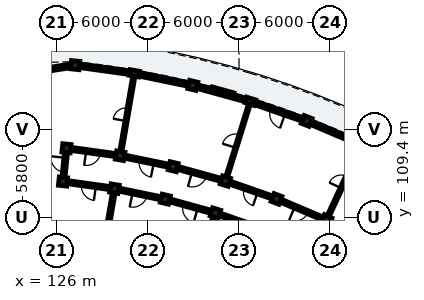
"""IFC4 building model, lengths in metres.
Left out: names, types, materials, properties, quantities, classifications, styles, units other than length and angle.
Written with IfcOpenShell. Run it as: python <this file> out.ifc"""

import sys

from ifc_helpers import new_model, si_unit, direction, frame, frame_2d, origin, origin_2d, place, context, subcontext, project, spatial, rectangle, extrude, element, fill, save


model = new_model("IFC4")
c1 = context("Model", 3, precision=1e-05, world=origin(), true_north=direction((0.0, 1.0)))
c2 = subcontext(c1, "Body", "Model", "MODEL_VIEW")
j1 = project(units=[si_unit("LENGTHUNIT", "METRE"), si_unit("PLANEANGLEUNIT", "RADIAN")], contexts=[c1])
p1 = place(None, origin())
s1 = spatial("IfcSite", under=j1, at=p1, CompositionType="ELEMENT")
p2 = place(p1, origin())
s2 = spatial("IfcBuilding", under=s1, at=p2, CompositionType="ELEMENT")
p3 = place(p2, frame((0.0, 0.0, 15.56)))
s3 = spatial("IfcBuildingStorey", under=s2, at=p3, CompositionType="ELEMENT", Elevation=15.56)
for number, where, z_axis, x_axis in (
    (1, (143.748, 109.23, 0.0), (0.0, 0.0, 1.0), (0.421, 0.907, 0.0)),
    (2, (140.468, 110.622, 0.0), (0.0, 0.0, 1.0), (0.36, 0.933, 0.0)),
    (3, (142.448, 115.753, 0.0), (0.0, 0.0, 1.0), (0.36, 0.933, 0.0)),
    (4, (136.448, 109.695, 0.0), (0.0, 0.0, 1.0), (0.298, 0.955, 0.0)),
    (5, (137.103, 111.795, 0.0), (0.0, 0.0, 1.0), (0.298, 0.955, 0.0)),
):
    element("IfcColumn", number, at=place(p3, frame(where, z_axis=z_axis, x_axis=x_axis)), inside=s3, PredefinedType="COLUMN", context=c2, shape_type="SweptSolid", body=[
        extrude(rectangle(XDim=0.55, YDim=0.55, at=origin_2d()), origin(), (0.0, 0.0, 1.0), 3.11),
    ])
p4 = place(p3, frame((138.742, 117.046, 0.0), z_axis=(0.0, 0.0, 1.0), x_axis=(0.297930225503, 0.954587649581, 0.0)))
e6 = element("IfcColumn", 6, at=p4, inside=s3, PredefinedType="PILASTER", context=c2, shape_type="SweptSolid", body=[
    extrude(rectangle(XDim=0.38, YDim=0.62, at=origin_2d()), origin(), (0.0, 0.0, 1.0), 3.11),
])
for number, where, z_axis, x_axis in (
    (7, (133.153, 110.606, 0.0), (0.0, 0.0, 1.0), (0.234, 0.972, 0.0)),
    (8, (133.669, 112.744, 0.0), (0.0, 0.0, 1.0), (0.234, 0.972, 0.0)),
    (9, (134.958, 118.091, 0.0), (0.0, 0.0, 1.0), (0.234, 0.972, 0.0)),
    (10, (129.806, 111.297, 0.0), (0.0, 0.0, 1.0), (0.17, 0.985, 0.0)),
    (11, (130.179, 113.465, 0.0), (0.0, 0.0, 1.0), (0.17, 0.985, 0.0)),
):
    element("IfcColumn", number, at=place(p3, frame(where, z_axis=z_axis, x_axis=x_axis)), inside=s3, PredefinedType="COLUMN", context=c2, shape_type="SweptSolid", body=[
        extrude(rectangle(XDim=0.55, YDim=0.55, at=origin_2d()), origin(), (0.0, 0.0, 1.0), 3.11),
    ])
p5 = place(p3, frame((131.113, 118.885, 0.0), z_axis=(0.0, 0.0, 1.0), x_axis=(0.169827230012, 0.985473851478, 0.0)))
e12 = element("IfcColumn", 12, at=p5, inside=s3, PredefinedType="PILASTER", context=c2, shape_type="SweptSolid", body=[
    extrude(rectangle(XDim=0.38, YDim=0.62, at=origin_2d()), origin(), (0.0, 0.0, 1.0), 3.11),
])
for number, where, z_axis, x_axis in (
    (13, (126.42, 111.766, 0.0), (0.0, 0.0, 1.0), (0.105, 0.995, 0.0)),
    (14, (126.65, 113.954, 0.0), (0.0, 0.0, 1.0), (0.105, 0.995, 0.0)),
    (15, (127.225, 119.424, 0.0), (0.0, 0.0, 1.0), (0.105, 0.995, 0.0)),
):
    element("IfcColumn", number, at=place(p3, frame(where, z_axis=z_axis, x_axis=x_axis)), inside=s3, PredefinedType="COLUMN", context=c2, shape_type="SweptSolid", body=[
        extrude(rectangle(XDim=0.55, YDim=0.55, at=origin_2d()), origin(), (0.0, 0.0, 1.0), 3.11),
    ])
p6 = place(p3, frame((145.915, 114.282, 0.0), z_axis=(0.0, 0.0, 1.0), x_axis=(-0.920502438884, 0.390736816807, 0.0)))
e16 = element("IfcWall", 16, at=p6, inside=s3, PredefinedType="SOLIDWALL", context=c2, shape_type="SweptSolid", body=[
    extrude(rectangle(XDim=3.521, YDim=0.24, at=frame_2d((1.76, 0.0))), origin(), (0.0, 0.0, 1.0), 2.355),
])
p7 = place(p6, frame((0.885, 0.0, 0.35)))
e17 = element("IfcOpeningElement", 17, at=p7, cuts=e16, PredefinedType="OPENING", context=c2, shape_type="SweptSolid", body=[
    extrude(rectangle(XDim=1.75, YDim=1.85, at=frame_2d((0.875, 0.925))), frame((0.0, 0.13, 0.0), z_axis=(0.0, -1.0, 0.0), x_axis=(1.0, 0.0, 0.0)), (0.0, 0.0, 1.0), 0.26),
])
p8 = place(p3, frame((142.217, 115.834, 0.0), z_axis=(0.0, 0.0, 1.0), x_axis=(-0.944267366677, 0.329179495455, 0.0)))
e18 = element("IfcWall", 18, at=p8, inside=s3, PredefinedType="SOLIDWALL", context=c2, shape_type="SweptSolid", body=[
    extrude(rectangle(XDim=3.521, YDim=0.24, at=frame_2d((1.76, 0.0))), origin(), (0.0, 0.0, 1.0), 2.355),
])
p9 = place(p8, frame((1.25, 0.0, 0.0)))
e19 = element("IfcOpeningElement", 19, at=p9, cuts=e18, PredefinedType="OPENING", context=c2, shape_type="SweptSolid", body=[
    extrude(rectangle(XDim=1.02, YDim=2.14, at=frame_2d((0.51, 1.07))), frame((0.0, 0.13, 0.0), z_axis=(0.0, -1.0, 0.0), x_axis=(1.0, 0.0, 0.0)), (0.0, 0.0, 1.0), 0.26),
])
p10 = place(p3, frame((138.587, 117.088, 0.0), z_axis=(0.0, 0.0, 1.0), x_axis=(-0.963894473631, 0.266284516456, 0.0)))
e20 = element("IfcWall", 20, at=p10, inside=s3, PredefinedType="SOLIDWALL", context=c2, shape_type="SweptSolid", body=[
    extrude(rectangle(XDim=3.521, YDim=0.24, at=frame_2d((1.76, 0.0))), origin(), (0.0, 0.0, 1.0), 2.355),
])
p11 = place(p10, frame((1.02, 0.0, 0.55)))
e21 = element("IfcOpeningElement", 21, at=p11, cuts=e20, PredefinedType="OPENING", context=c2, shape_type="SweptSolid", body=[
    extrude(rectangle(XDim=1.48, YDim=1.62, at=frame_2d((0.74, 0.81))), frame((0.0, 0.13, 0.0), z_axis=(0.0, -1.0, 0.0), x_axis=(1.0, 0.0, 0.0)), (0.0, 0.0, 1.0), 0.26),
])
p12 = place(p3, frame((134.718, 118.141, 0.0), z_axis=(0.0, 0.0, 1.0), x_axis=(-0.979340051053, 0.202220336275, 0.0)))
e22 = element("IfcWall", 22, at=p12, inside=s3, PredefinedType="SOLIDWALL", context=c2, shape_type="SweptSolid", body=[
    extrude(rectangle(XDim=3.521, YDim=0.24, at=frame_2d((1.76, 0.0))), origin(), (0.0, 0.0, 1.0), 2.355),
])
p13 = place(p12, frame((1.16, 0.0, 0.55)))
e23 = element("IfcOpeningElement", 23, at=p13, cuts=e22, PredefinedType="OPENING", context=c2, shape_type="SweptSolid", body=[
    extrude(rectangle(XDim=1.2, YDim=1.51, at=frame_2d((0.6, 0.755))), frame((0.0, 0.13, 0.0), z_axis=(0.0, -1.0, 0.0), x_axis=(1.0, 0.0, 0.0)), (0.0, 0.0, 1.0), 0.26),
])
p14 = place(p3, frame((130.955, 118.907, 0.0), z_axis=(0.0, 0.0, 1.0), x_axis=(-0.990539718913, 0.137226328578, 0.0)))
e24 = element("IfcWall", 24, at=p14, inside=s3, PredefinedType="SOLIDWALL", context=c2, shape_type="SweptSolid", body=[
    extrude(rectangle(XDim=3.521, YDim=0.24, at=frame_2d((1.76, 0.0))), origin(), (0.0, 0.0, 1.0), 2.355),
])
p15 = place(p14, frame((1.1, 0.0, 0.55)))
e25 = element("IfcOpeningElement", 25, at=p15, cuts=e24, PredefinedType="OPENING", context=c2, shape_type="SweptSolid", body=[
    extrude(rectangle(XDim=1.32, YDim=1.585, at=frame_2d((0.66, 0.792))), frame((0.0, 0.13, 0.0), z_axis=(0.0, -1.0, 0.0), x_axis=(1.0, 0.0, 0.0)), (0.0, 0.0, 1.0), 0.26),
])
p16 = place(p3, frame((123.365, 118.812, 0.0), z_axis=(0.0, 0.0, 1.0), x_axis=(0.987690429048, 0.156421278498, 0.0)))
e26 = element("IfcWall", 26, at=p16, inside=s3, PredefinedType="SOLIDWALL", context=c2, shape_type="SweptSolid", body=[
    extrude(rectangle(XDim=3.908, YDim=0.24, at=frame_2d((1.954, 0.0))), origin(), (0.0, 0.0, 1.0), 2.355),
])
p17 = place(p16, frame((1.029, 0.0, 0.4)))
e27 = element("IfcOpeningElement", 27, at=p17, cuts=e26, PredefinedType="OPENING", context=c2, shape_type="SweptSolid", body=[
    extrude(rectangle(XDim=1.85, YDim=1.72, at=frame_2d((0.925, 0.86))), frame((0.0, 0.13, 0.0), z_axis=(0.0, -1.0, 0.0), x_axis=(1.0, 0.0, 0.0)), (0.0, 0.0, 1.0), 0.26),
])
p18 = place(p3, frame((143.916, 109.593, 0.0), z_axis=(0.0, 0.0, 1.0), x_axis=(0.420862519045, 0.907124434718, 0.0)))
e28 = element("IfcWall", 28, at=p18, inside=s3, PredefinedType="PLUMBINGWALL", context=c2, shape_type="SweptSolid", body=[
    extrude(rectangle(XDim=4.7, YDim=0.15, at=frame_2d((2.35, 0.0))), origin(), (0.0, 0.0, 1.0), 2.37),
])
p19 = place(p18, frame((1.92, 0.0, 0.0)))
e29 = element("IfcOpeningElement", 29, at=p19, cuts=e28, PredefinedType="OPENING", context=c2, shape_type="SweptSolid", body=[
    extrude(rectangle(XDim=0.86, YDim=2.06, at=frame_2d((0.43, 1.03))), frame((0.0, 0.085, 0.0), z_axis=(0.0, -1.0, 0.0), x_axis=(1.0, 0.0, 0.0)), (0.0, 0.0, 1.0), 0.17),
])
p20 = place(p3, frame((143.425, 109.367, 0.0), z_axis=(0.0, 0.0, 1.0), x_axis=(-0.920511160294, 0.390716270168, 0.0)))
e30 = element("IfcWall", 30, at=p20, inside=s3, PredefinedType="PARTITIONING", context=c2, shape_type="SweptSolid", body=[
    extrude(rectangle(XDim=2.863, YDim=0.205, at=frame_2d((1.432, 0.0))), origin(), (0.0, 0.0, 1.0), 2.37),
])
p21 = place(p20, frame((0.957, 0.0, 0.0)))
e31 = element("IfcOpeningElement", 31, at=p21, cuts=e30, PredefinedType="OPENING", context=c2, shape_type="SweptSolid", body=[
    extrude(rectangle(XDim=0.95, YDim=2.13, at=frame_2d((0.475, 1.065))), frame((0.0, 0.113, 0.0), z_axis=(0.0, -1.0, 0.0), x_axis=(1.0, 0.0, 0.0)), (0.0, 0.0, 1.0), 0.225),
])
p22 = place(p3, frame((140.137, 110.738, 0.0), z_axis=(0.0, 0.0, 1.0), x_axis=(-0.944253820929, 0.329218349522, 0.0)))
e32 = element("IfcWall", 32, at=p22, inside=s3, PredefinedType="PARTITIONING", context=c2, shape_type="SweptSolid", body=[
    extrude(rectangle(XDim=2.863, YDim=0.205, at=frame_2d((1.432, 0.0))), origin(), (0.0, 0.0, 1.0), 2.37),
])
p23 = place(p22, frame((0.967, 0.0, 0.0)))
e33 = element("IfcOpeningElement", 33, at=p23, cuts=e32, PredefinedType="OPENING", context=c2, shape_type="SweptSolid", body=[
    extrude(rectangle(XDim=0.93, YDim=2.12, at=frame_2d((0.465, 1.06))), frame((0.0, 0.113, 0.0), z_axis=(0.0, -1.0, 0.0), x_axis=(1.0, 0.0, 0.0)), (0.0, 0.0, 1.0), 0.225),
])
p24 = place(p3, frame((139.345, 108.685, 0.0), z_axis=(0.0, 0.0, 1.0), x_axis=(-0.944265123647, 0.329185929627, 0.0)))
e34 = element("IfcWall", 34, at=p24, inside=s3, PredefinedType="PARTITIONING", context=c2, shape_type="SweptSolid", body=[
    extrude(rectangle(XDim=2.718, YDim=0.205, at=frame_2d((1.359, 0.0))), origin(), (0.0, 0.0, 1.0), 2.37),
])
p25 = place(p24, frame((0.894, 0.0, 0.0)))
e35 = element("IfcOpeningElement", 35, at=p25, cuts=e34, PredefinedType="OPENING", context=c2, shape_type="SweptSolid", body=[
    extrude(rectangle(XDim=0.93, YDim=2.12, at=frame_2d((0.465, 1.06))), frame((0.0, 0.113, 0.0), z_axis=(0.0, -1.0, 0.0), x_axis=(1.0, 0.0, 0.0)), (0.0, 0.0, 1.0), 0.225),
])
p26 = place(p3, frame((137.222, 112.177, 0.0), z_axis=(0.0, 0.0, 1.0), x_axis=(0.297905254614, 0.954595442726, 0.0)))
e36 = element("IfcWall", 36, at=p26, inside=s3, PredefinedType="PARTITIONING", context=c2, shape_type="SweptSolid", body=[
    extrude(rectangle(XDim=4.7, YDim=0.125, at=frame_2d((2.35, 0.0))), origin(), (0.0, 0.0, 1.0), 2.37),
])
p27 = place(p26, frame((1.895, 0.0, 0.0)))
e37 = element("IfcOpeningElement", 37, at=p27, cuts=e36, PredefinedType="OPENING", context=c2, shape_type="SweptSolid", body=[
    extrude(rectangle(XDim=0.91, YDim=2.1, at=frame_2d((0.455, 1.05))), frame((0.0, 0.073, 0.0), z_axis=(0.0, -1.0, 0.0), x_axis=(1.0, 0.0, 0.0)), (0.0, 0.0, 1.0), 0.145),
])
p28 = place(p3, frame((134.362, 103.013, 0.0), z_axis=(0.0, 0.0, 1.0), x_axis=(0.2979590431, 0.954578655028, 0.0)))
e38 = element("IfcWall", 38, at=p28, inside=s3, PredefinedType="PARTITIONING", context=c2, shape_type="SweptSolid", body=[
    extrude(rectangle(XDim=6.6, YDim=0.185, at=frame_2d((3.3, 0.0))), origin(), (0.0, 0.0, 1.0), 2.37),
])
p29 = place(p3, frame((136.766, 111.889, 0.0), z_axis=(0.0, 0.0, 1.0), x_axis=(-0.963890789093, 0.266297853356, 0.0)))
e39 = element("IfcWall", 39, at=p29, inside=s3, PredefinedType="PARTITIONING", context=c2, shape_type="SweptSolid", body=[
    extrude(rectangle(XDim=2.863, YDim=0.205, at=frame_2d((1.432, 0.0))), origin(), (0.0, 0.0, 1.0), 2.37),
])
p30 = place(p29, frame((0.937, 0.0, 0.0)))
e40 = element("IfcOpeningElement", 40, at=p30, cuts=e39, PredefinedType="OPENING", context=c2, shape_type="SweptSolid", body=[
    extrude(rectangle(XDim=0.99, YDim=2.16, at=frame_2d((0.495, 1.08))), frame((0.0, 0.113, 0.0), z_axis=(0.0, -1.0, 0.0), x_axis=(1.0, 0.0, 0.0)), (0.0, 0.0, 1.0), 0.225),
])
p31 = place(p3, frame((136.11, 109.789, 0.0), z_axis=(0.0, 0.0, 1.0), x_axis=(-0.96388375821, 0.266323301006, 0.0)))
e41 = element("IfcWall", 41, at=p31, inside=s3, PredefinedType="PARTITIONING", context=c2, shape_type="SweptSolid", body=[
    extrude(rectangle(XDim=2.718, YDim=0.205, at=frame_2d((1.359, 0.0))), origin(), (0.0, 0.0, 1.0), 2.37),
])
p32 = place(p31, frame((0.864, 0.0, 0.0)))
e42 = element("IfcOpeningElement", 42, at=p32, cuts=e41, PredefinedType="OPENING", context=c2, shape_type="SweptSolid", body=[
    extrude(rectangle(XDim=0.99, YDim=2.16, at=frame_2d((0.495, 1.08))), frame((0.0, 0.113, 0.0), z_axis=(0.0, -1.0, 0.0), x_axis=(1.0, 0.0, 0.0)), (0.0, 0.0, 1.0), 0.225),
])
p33 = place(p3, frame((133.326, 112.815, 0.0), z_axis=(0.0, 0.0, 1.0), x_axis=(-0.979348418612, 0.202179808492, 0.0)))
e43 = element("IfcWall", 43, at=p33, inside=s3, PredefinedType="PARTITIONING", context=c2, shape_type="SweptSolid", body=[
    extrude(rectangle(XDim=2.863, YDim=0.205, at=frame_2d((1.432, 0.0))), origin(), (0.0, 0.0, 1.0), 2.37),
])
p34 = place(p33, frame((0.947, 0.0, 0.0)))
e44 = element("IfcOpeningElement", 44, at=p34, cuts=e43, PredefinedType="OPENING", context=c2, shape_type="SweptSolid", body=[
    extrude(rectangle(XDim=0.97, YDim=2.15, at=frame_2d((0.485, 1.075))), frame((0.0, 0.113, 0.0), z_axis=(0.0, -1.0, 0.0), x_axis=(1.0, 0.0, 0.0)), (0.0, 0.0, 1.0), 0.225),
])
p35 = place(p3, frame((132.81, 110.677, 0.0), z_axis=(0.0, 0.0, 1.0), x_axis=(-0.979349423541, 0.202174940608, 0.0)))
e45 = element("IfcWall", 45, at=p35, inside=s3, PredefinedType="PARTITIONING", context=c2, shape_type="SweptSolid", body=[
    extrude(rectangle(XDim=2.718, YDim=0.205, at=frame_2d((1.359, 0.0))), origin(), (0.0, 0.0, 1.0), 2.37),
])
p36 = place(p35, frame((0.874, 0.0, 0.0)))
e46 = element("IfcOpeningElement", 46, at=p36, cuts=e45, PredefinedType="OPENING", context=c2, shape_type="SweptSolid", body=[
    extrude(rectangle(XDim=0.97, YDim=2.15, at=frame_2d((0.485, 1.075))), frame((0.0, 0.113, 0.0), z_axis=(0.0, -1.0, 0.0), x_axis=(1.0, 0.0, 0.0)), (0.0, 0.0, 1.0), 0.225),
])
p37 = place(p3, frame((130.247, 113.859, 0.0), z_axis=(0.0, 0.0, 1.0), x_axis=(0.169812980219, 0.985476307046, 0.0)))
e47 = element("IfcWall", 47, at=p37, inside=s3, PredefinedType="PLUMBINGWALL", context=c2, shape_type="SweptSolid", body=[
    extrude(rectangle(XDim=4.7, YDim=0.15, at=frame_2d((2.35, 0.0))), origin(), (0.0, 0.0, 1.0), 2.37),
])
p38 = place(p37, frame((1.92, 0.0, 0.0)))
e48 = element("IfcOpeningElement", 48, at=p38, cuts=e47, PredefinedType="OPENING", context=c2, shape_type="SweptSolid", body=[
    extrude(rectangle(XDim=0.86, YDim=2.06, at=frame_2d((0.43, 1.03))), frame((0.0, 0.085, 0.0), z_axis=(0.0, -1.0, 0.0), x_axis=(1.0, 0.0, 0.0)), (0.0, 0.0, 1.0), 0.17),
])
p39 = place(p3, frame((128.617, 104.398, 0.0), z_axis=(0.0, 0.0, 1.0), x_axis=(0.169825160084, 0.985474208187, 0.0)))
e49 = element("IfcWall", 49, at=p39, inside=s3, PredefinedType="PARTITIONING", context=c2, shape_type="SweptSolid", body=[
    extrude(rectangle(XDim=6.6, YDim=0.185, at=frame_2d((3.3, 0.0))), origin(), (0.0, 0.0, 1.0), 2.37),
])
p40 = place(p3, frame((129.833, 113.513, 0.0), z_axis=(0.0, 0.0, 1.0), x_axis=(-0.990544162976, 0.137194246211, 0.0)))
e50 = element("IfcWall", 50, at=p40, inside=s3, PredefinedType="PARTITIONING", context=c2, shape_type="SweptSolid", body=[
    extrude(rectangle(XDim=2.863, YDim=0.205, at=frame_2d((1.432, 0.0))), origin(), (0.0, 0.0, 1.0), 2.37),
])
p41 = place(p40, frame((0.957, 0.0, 0.0)))
e51 = element("IfcOpeningElement", 51, at=p41, cuts=e50, PredefinedType="OPENING", context=c2, shape_type="SweptSolid", body=[
    extrude(rectangle(XDim=0.95, YDim=2.13, at=frame_2d((0.475, 1.065))), frame((0.0, 0.113, 0.0), z_axis=(0.0, -1.0, 0.0), x_axis=(1.0, 0.0, 0.0)), (0.0, 0.0, 1.0), 0.225),
])
p42 = place(p3, frame((129.459, 111.345, 0.0), z_axis=(0.0, 0.0, 1.0), x_axis=(-0.990535404475, 0.137257467855, 0.0)))
e52 = element("IfcWall", 52, at=p42, inside=s3, PredefinedType="PARTITIONING", context=c2, shape_type="SweptSolid", body=[
    extrude(rectangle(XDim=2.718, YDim=0.205, at=frame_2d((1.359, 0.0))), origin(), (0.0, 0.0, 1.0), 2.37),
])
p43 = place(p42, frame((0.884, 0.0, 0.0)))
e53 = element("IfcOpeningElement", 53, at=p43, cuts=e52, PredefinedType="OPENING", context=c2, shape_type="SweptSolid", body=[
    extrude(rectangle(XDim=0.95, YDim=2.13, at=frame_2d((0.475, 1.065))), frame((0.0, 0.113, 0.0), z_axis=(0.0, -1.0, 0.0), x_axis=(1.0, 0.0, 0.0)), (0.0, 0.0, 1.0), 0.225),
])
p44 = place(p3, frame((126.425, 111.816, 0.0), z_axis=(0.0, 0.0, 1.0), x_axis=(0.104509292252, 0.994523910136, 0.0)))
e54 = element("IfcWall", 54, at=p44, inside=s3, PredefinedType="PARTITIONING", context=c2, shape_type="SweptSolid", body=[
    extrude(rectangle(XDim=2.1, YDim=0.205, at=frame_2d((1.05, 0.0))), origin(), (0.0, 0.0, 1.0), 2.37),
])
p45 = place(p44, frame((0.57, 0.0, 0.0)))
e55 = element("IfcOpeningElement", 55, at=p45, cuts=e54, PredefinedType="OPENING", context=c2, shape_type="SweptSolid", body=[
    extrude(rectangle(XDim=0.95, YDim=2.13, at=frame_2d((0.475, 1.065))), frame((0.0, 0.113, 0.0), z_axis=(0.0, -1.0, 0.0), x_axis=(1.0, 0.0, 0.0)), (0.0, 0.0, 1.0), 0.225),
])
p46 = place(p7, origin())
e56 = element("IfcWindow", 56, at=p46, inside=s3, PartitioningType="SINGLE_PANEL", PredefinedType="WINDOW", context=c2, shape_type="SweptSolid", body=[
    extrude(rectangle(XDim=1.75, YDim=1.85, at=frame_2d((0.875, 0.925))), frame((0.0, 0.03, 0.0), z_axis=(0.0, -1.0, 0.0), x_axis=(1.0, 0.0, 0.0)), (0.0, 0.0, 1.0), 0.06),
])
fill(e17, e56)
p47 = place(p9, origin())
e57 = element("IfcDoor", 57, at=p47, inside=s3, OperationType="SINGLE_SWING_LEFT", PredefinedType="DOOR", context=c2, shape_type="SweptSolid", body=[
    extrude(rectangle(XDim=1.02, YDim=2.14, at=frame_2d((0.51, 1.07))), frame((0.0, 0.025, 0.0), z_axis=(0.0, -1.0, 0.0), x_axis=(1.0, 0.0, 0.0)), (0.0, 0.0, 1.0), 0.05),
])
fill(e19, e57)
p48 = place(p11, origin())
e58 = element("IfcWindow", 58, at=p48, inside=s3, PartitioningType="SINGLE_PANEL", PredefinedType="WINDOW", context=c2, shape_type="SweptSolid", body=[
    extrude(rectangle(XDim=1.48, YDim=1.62, at=frame_2d((0.74, 0.81))), frame((0.0, 0.03, 0.0), z_axis=(0.0, -1.0, 0.0), x_axis=(1.0, 0.0, 0.0)), (0.0, 0.0, 1.0), 0.06),
])
fill(e21, e58)
p49 = place(p13, origin())
e59 = element("IfcWindow", 59, at=p49, inside=s3, PartitioningType="SINGLE_PANEL", PredefinedType="WINDOW", context=c2, shape_type="SweptSolid", body=[
    extrude(rectangle(XDim=1.2, YDim=1.51, at=frame_2d((0.6, 0.755))), frame((0.0, 0.03, 0.0), z_axis=(0.0, -1.0, 0.0), x_axis=(1.0, 0.0, 0.0)), (0.0, 0.0, 1.0), 0.06),
])
fill(e23, e59)
p50 = place(p15, origin())
e60 = element("IfcWindow", 60, at=p50, inside=s3, PartitioningType="SINGLE_PANEL", PredefinedType="WINDOW", context=c2, shape_type="SweptSolid", body=[
    extrude(rectangle(XDim=1.32, YDim=1.585, at=frame_2d((0.66, 0.792))), frame((0.0, 0.03, 0.0), z_axis=(0.0, -1.0, 0.0), x_axis=(1.0, 0.0, 0.0)), (0.0, 0.0, 1.0), 0.06),
])
fill(e25, e60)
p51 = place(p17, origin())
e61 = element("IfcWindow", 61, at=p51, inside=s3, PartitioningType="SINGLE_PANEL", PredefinedType="WINDOW", context=c2, shape_type="SweptSolid", body=[
    extrude(rectangle(XDim=1.85, YDim=1.72, at=frame_2d((0.925, 0.86))), frame((0.0, 0.03, 0.0), z_axis=(0.0, -1.0, 0.0), x_axis=(1.0, 0.0, 0.0)), (0.0, 0.0, 1.0), 0.06),
])
fill(e27, e61)
p52 = place(p19, origin())
e62 = element("IfcDoor", 62, at=p52, inside=s3, OperationType="SINGLE_SWING_LEFT", PredefinedType="DOOR", context=c2, shape_type="SweptSolid", body=[
    extrude(rectangle(XDim=0.86, YDim=2.06, at=frame_2d((0.43, 1.03))), frame((0.0, 0.025, 0.0), z_axis=(0.0, -1.0, 0.0), x_axis=(1.0, 0.0, 0.0)), (0.0, 0.0, 1.0), 0.05),
])
fill(e29, e62)
p53 = place(p21, origin())
e63 = element("IfcDoor", 63, at=p53, inside=s3, OperationType="SINGLE_SWING_RIGHT", PredefinedType="DOOR", context=c2, shape_type="SweptSolid", body=[
    extrude(rectangle(XDim=0.95, YDim=2.13, at=frame_2d((0.475, 1.065))), frame((0.0, 0.025, 0.0), z_axis=(0.0, -1.0, 0.0), x_axis=(1.0, 0.0, 0.0)), (0.0, 0.0, 1.0), 0.05),
])
fill(e31, e63)
p54 = place(p23, origin())
e64 = element("IfcDoor", 64, at=p54, inside=s3, OperationType="SINGLE_SWING_LEFT", PredefinedType="DOOR", context=c2, shape_type="SweptSolid", body=[
    extrude(rectangle(XDim=0.93, YDim=2.12, at=frame_2d((0.465, 1.06))), frame((0.0, 0.025, 0.0), z_axis=(0.0, -1.0, 0.0), x_axis=(1.0, 0.0, 0.0)), (0.0, 0.0, 1.0), 0.05),
])
fill(e33, e64)
p55 = place(p25, origin())
e65 = element("IfcDoor", 65, at=p55, inside=s3, OperationType="SINGLE_SWING_RIGHT", PredefinedType="DOOR", context=c2, shape_type="SweptSolid", body=[
    extrude(rectangle(XDim=0.93, YDim=2.12, at=frame_2d((0.465, 1.06))), frame((0.0, 0.025, 0.0), z_axis=(0.0, -1.0, 0.0), x_axis=(1.0, 0.0, 0.0)), (0.0, 0.0, 1.0), 0.05),
])
fill(e35, e65)
p56 = place(p27, origin())
e66 = element("IfcDoor", 66, at=p56, inside=s3, OperationType="SINGLE_SWING_LEFT", PredefinedType="DOOR", context=c2, shape_type="SweptSolid", body=[
    extrude(rectangle(XDim=0.91, YDim=2.1, at=frame_2d((0.455, 1.05))), frame((0.0, 0.025, 0.0), z_axis=(0.0, -1.0, 0.0), x_axis=(1.0, 0.0, 0.0)), (0.0, 0.0, 1.0), 0.05),
])
fill(e37, e66)
p57 = place(p30, origin())
e67 = element("IfcDoor", 67, at=p57, inside=s3, OperationType="SINGLE_SWING_RIGHT", PredefinedType="DOOR", context=c2, shape_type="SweptSolid", body=[
    extrude(rectangle(XDim=0.99, YDim=2.16, at=frame_2d((0.495, 1.08))), frame((0.0, 0.025, 0.0), z_axis=(0.0, -1.0, 0.0), x_axis=(1.0, 0.0, 0.0)), (0.0, 0.0, 1.0), 0.05),
])
fill(e40, e67)
p58 = place(p32, origin())
e68 = element("IfcDoor", 68, at=p58, inside=s3, OperationType="SINGLE_SWING_LEFT", PredefinedType="DOOR", context=c2, shape_type="SweptSolid", body=[
    extrude(rectangle(XDim=0.99, YDim=2.16, at=frame_2d((0.495, 1.08))), frame((0.0, 0.025, 0.0), z_axis=(0.0, -1.0, 0.0), x_axis=(1.0, 0.0, 0.0)), (0.0, 0.0, 1.0), 0.05),
])
fill(e42, e68)
p59 = place(p34, origin())
e69 = element("IfcDoor", 69, at=p59, inside=s3, OperationType="SINGLE_SWING_LEFT", PredefinedType="DOOR", context=c2, shape_type="SweptSolid", body=[
    extrude(rectangle(XDim=0.97, YDim=2.15, at=frame_2d((0.485, 1.075))), frame((0.0, 0.025, 0.0), z_axis=(0.0, -1.0, 0.0), x_axis=(1.0, 0.0, 0.0)), (0.0, 0.0, 1.0), 0.05),
])
fill(e44, e69)
p60 = place(p36, origin())
e70 = element("IfcDoor", 70, at=p60, inside=s3, OperationType="SINGLE_SWING_RIGHT", PredefinedType="DOOR", context=c2, shape_type="SweptSolid", body=[
    extrude(rectangle(XDim=0.97, YDim=2.15, at=frame_2d((0.485, 1.075))), frame((0.0, 0.025, 0.0), z_axis=(0.0, -1.0, 0.0), x_axis=(1.0, 0.0, 0.0)), (0.0, 0.0, 1.0), 0.05),
])
fill(e46, e70)
p61 = place(p38, origin())
e71 = element("IfcDoor", 71, at=p61, inside=s3, OperationType="SINGLE_SWING_LEFT", PredefinedType="DOOR", context=c2, shape_type="SweptSolid", body=[
    extrude(rectangle(XDim=0.86, YDim=2.06, at=frame_2d((0.43, 1.03))), frame((0.0, 0.025, 0.0), z_axis=(0.0, -1.0, 0.0), x_axis=(1.0, 0.0, 0.0)), (0.0, 0.0, 1.0), 0.05),
])
fill(e48, e71)
p62 = place(p41, origin())
e72 = element("IfcDoor", 72, at=p62, inside=s3, OperationType="SINGLE_SWING_RIGHT", PredefinedType="DOOR", context=c2, shape_type="SweptSolid", body=[
    extrude(rectangle(XDim=0.95, YDim=2.13, at=frame_2d((0.475, 1.065))), frame((0.0, 0.025, 0.0), z_axis=(0.0, -1.0, 0.0), x_axis=(1.0, 0.0, 0.0)), (0.0, 0.0, 1.0), 0.05),
])
fill(e51, e72)
p63 = place(p43, origin())
e73 = element("IfcDoor", 73, at=p63, inside=s3, OperationType="SINGLE_SWING_LEFT", PredefinedType="DOOR", context=c2, shape_type="SweptSolid", body=[
    extrude(rectangle(XDim=0.95, YDim=2.13, at=frame_2d((0.475, 1.065))), frame((0.0, 0.025, 0.0), z_axis=(0.0, -1.0, 0.0), x_axis=(1.0, 0.0, 0.0)), (0.0, 0.0, 1.0), 0.05),
])
fill(e53, e73)
p64 = place(p45, origin())
e74 = element("IfcDoor", 74, at=p64, inside=s3, OperationType="SINGLE_SWING_RIGHT", PredefinedType="DOOR", context=c2, shape_type="SweptSolid", body=[
    extrude(rectangle(XDim=0.95, YDim=2.13, at=frame_2d((0.475, 1.065))), frame((0.0, 0.025, 0.0), z_axis=(0.0, -1.0, 0.0), x_axis=(1.0, 0.0, 0.0)), (0.0, 0.0, 1.0), 0.05),
])
fill(e55, e74)
save(model, sys.argv[1])
